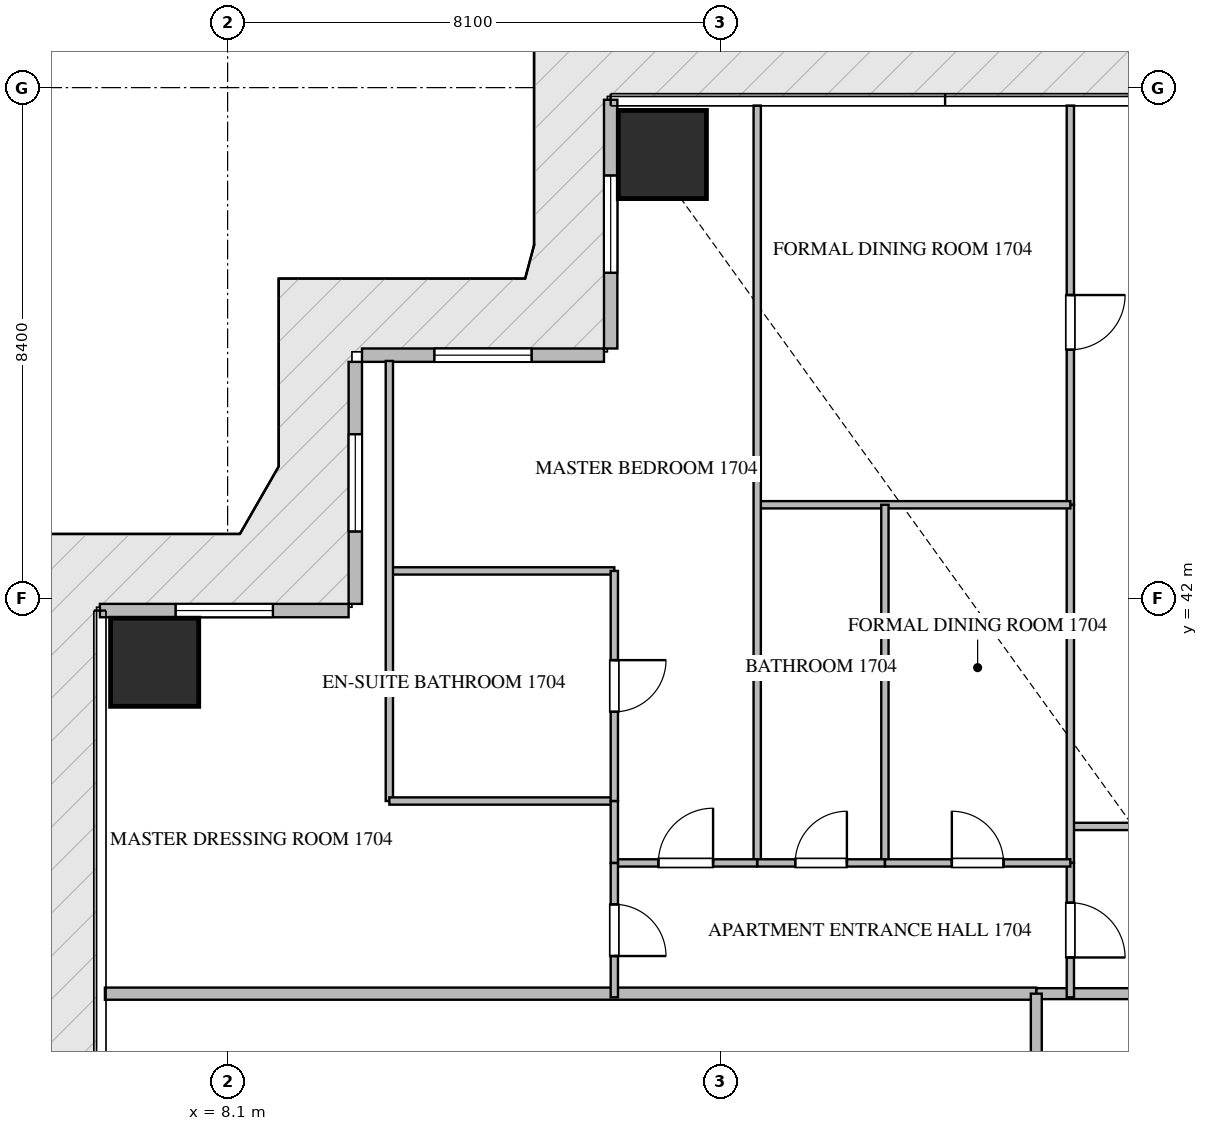
"""IFC4 building model, lengths in metres.
Left out: names, types, materials, properties, quantities, classifications, styles, units other than length and angle.
Written with IfcOpenShell. Run it as: python <this file> out.ifc"""

import sys

from ifc_helpers import new_model, si_unit, direction, frame, frame_2d, origin, origin_2d, place, context, subcontext, project, spatial, rectangle, extrude, source, transform, mapped, element, fill, save


model = new_model("IFC4")
c1 = context("Model", 3, precision=1e-05, world=origin(), true_north=direction((0.0, 1.0)))
c2 = subcontext(c1, "Body", "Model", "MODEL_VIEW")
j1 = project(units=[si_unit("LENGTHUNIT", "METRE"), si_unit("PLANEANGLEUNIT", "RADIAN")], contexts=[c1])
p1 = place(None, origin())
s1 = spatial("IfcSite", under=j1, at=p1, CompositionType="ELEMENT")
p2 = place(p1, origin())
s2 = spatial("IfcBuilding", under=s1, at=p2, CompositionType="ELEMENT")
p3 = place(p2, frame((0.0, 0.0, 71.7)))
s3 = spatial("IfcBuildingStorey", under=s2, at=p3, CompositionType="ELEMENT", Elevation=71.7)
m1 = source(origin(), c2, "Body", "SweptSolid", [
    extrude(rectangle(XDim=1.45, YDim=1.45, at=origin_2d()), origin(), (0.0, 0.0, 1.0), 3.75),
])
for number, where, z_axis, x_axis in (
    (1, (15.25, 49.3, -0.26), (0.0, 0.0, 1.0), (1.0, 0.0, 0.0)),
    (2, (6.9, 40.95, -0.26), (0.0, 0.0, 1.0), (1.0, 0.0, 0.0)),
):
    element("IfcColumn", number, at=place(p3, frame(where, z_axis=z_axis, x_axis=x_axis)), inside=s3, PredefinedType="COLUMN", context=c2, shape_type="MappedRepresentation", body=[
        mapped(m1, transform((0.0, 0.0, 0.0), scale=1.0)),
    ])
p4 = place(p3, frame((14.4, 50.2, 0.0), z_axis=(0.0, 0.0, 1.0), x_axis=(0.0, -1.0, 0.0)))
e3 = element("IfcWall", 3, at=p4, inside=s3, PredefinedType="ELEMENTEDWALL", context=c2, shape_type="SweptSolid", body=[
    extrude(rectangle(XDim=4.09, YDim=0.22, at=frame_2d((2.045, 0.0))), origin(), (0.0, 0.0, 1.0), 3.475),
])
p5 = place(p4, frame((1.245, 0.0, 0.65)))
e4 = element("IfcOpeningElement", 4, at=p5, cuts=e3, PredefinedType="OPENING", context=c2, shape_type="SweptSolid", body=[
    extrude(rectangle(XDim=1.6, YDim=2.1, at=frame_2d((0.8, 1.05))), frame((0.0, 0.12, 0.0), z_axis=(0.0, -1.0, 0.0), x_axis=(1.0, 0.0, 0.0)), (0.0, 0.0, 1.0), 0.24),
])
p6 = place(p3, frame((14.29, 46.0, 0.0), z_axis=(0.0, 0.0, 1.0), x_axis=(-1.0, 0.0, 0.0)))
e5 = element("IfcWall", 5, at=p6, inside=s3, PredefinedType="ELEMENTEDWALL", context=c2, shape_type="SweptSolid", body=[
    extrude(rectangle(XDim=3.98, YDim=0.22, at=frame_2d((1.99, 0.0))), origin(), (0.0, 0.0, 1.0), 3.475),
])
p7 = place(p6, frame((1.19, 0.0, 0.65)))
e6 = element("IfcOpeningElement", 6, at=p7, cuts=e5, PredefinedType="OPENING", context=c2, shape_type="SweptSolid", body=[
    extrude(rectangle(XDim=1.6, YDim=2.1, at=frame_2d((0.8, 1.05))), frame((0.0, 0.12, 0.0), z_axis=(0.0, -1.0, 0.0), x_axis=(1.0, 0.0, 0.0)), (0.0, 0.0, 1.0), 0.24),
])
p8 = place(p3, frame((10.2, 45.89, 0.0), z_axis=(0.0, 0.0, 1.0), x_axis=(0.0, -1.0, 0.0)))
e7 = element("IfcWall", 7, at=p8, inside=s3, PredefinedType="ELEMENTEDWALL", context=c2, shape_type="SweptSolid", body=[
    extrude(rectangle(XDim=3.98, YDim=0.22, at=frame_2d((1.99, 0.0))), origin(), (0.0, 0.0, 1.0), 3.475),
])
p9 = place(p8, frame((1.19, 0.0, 0.65)))
e8 = element("IfcOpeningElement", 8, at=p9, cuts=e7, PredefinedType="OPENING", context=c2, shape_type="SweptSolid", body=[
    extrude(rectangle(XDim=1.6, YDim=2.1, at=frame_2d((0.8, 1.05))), frame((0.0, 0.12, 0.0), z_axis=(0.0, -1.0, 0.0), x_axis=(1.0, 0.0, 0.0)), (0.0, 0.0, 1.0), 0.24),
])
p10 = place(p3, frame((10.09, 41.8, 0.0), z_axis=(0.0, 0.0, 1.0), x_axis=(-1.0, 0.0, 0.0)))
e9 = element("IfcWall", 9, at=p10, inside=s3, PredefinedType="ELEMENTEDWALL", context=c2, shape_type="SweptSolid", body=[
    extrude(rectangle(XDim=4.09, YDim=0.22, at=frame_2d((2.045, 0.0))), origin(), (0.0, 0.0, 1.0), 3.475),
])
p11 = place(p10, frame((1.245, 0.0, 0.65)))
e10 = element("IfcOpeningElement", 10, at=p11, cuts=e9, PredefinedType="OPENING", context=c2, shape_type="SweptSolid", body=[
    extrude(rectangle(XDim=1.6, YDim=2.1, at=frame_2d((0.8, 1.05))), frame((0.0, 0.12, 0.0), z_axis=(0.0, -1.0, 0.0), x_axis=(1.0, 0.0, 0.0)), (0.0, 0.0, 1.0), 0.24),
])
p12 = place(p3, frame((6.082, 35.5, 0.0), z_axis=(0.0, 0.0, 1.0), x_axis=(1.0, 0.0, 0.0)))
e11 = element("IfcWall", 11, at=p12, inside=s3, PredefinedType="PARTITIONING", context=c2, shape_type="SweptSolid", body=[
    extrude(rectangle(XDim=15.318, YDim=0.2, at=frame_2d((7.659, 0.0))), origin(), (0.0, 0.0, 1.0), 3.49),
])
p13 = place(p3, frame((21.402, 35.5, 0.0), z_axis=(0.0, 0.0, 1.0), x_axis=(1.0, 0.0, 0.0)))
e12 = element("IfcWall", 12, at=p13, inside=s3, PredefinedType="PARTITIONING", context=c2, shape_type="SweptSolid", body=[
    extrude(rectangle(XDim=21.996, YDim=0.18, at=frame_2d((10.998, 0.0))), origin(), (0.0, 0.0, 1.0), 3.49),
])
p14 = place(p13, frame((5.774, 0.0, 0.0)))
e13 = element("IfcOpeningElement", 13, at=p14, cuts=e12, PredefinedType="OPENING", context=c2, shape_type="SweptSolid", body=[
    extrude(rectangle(XDim=1.0, YDim=2.15, at=frame_2d((0.5, 1.075))), frame((0.0, 0.1, 0.0), z_axis=(0.0, -1.0, 0.0), x_axis=(1.0, 0.0, 0.0)), (0.0, 0.0, 1.0), 0.2),
])
p15 = place(p13, frame((16.272, 0.0, 0.0)))
e14 = element("IfcOpeningElement", 14, at=p15, cuts=e12, PredefinedType="OPENING", context=c2, shape_type="SweptSolid", body=[
    extrude(rectangle(XDim=1.0, YDim=2.15, at=frame_2d((0.5, 1.075))), frame((0.0, 0.1, 0.0), z_axis=(0.0, -1.0, 0.0), x_axis=(1.0, 0.0, 0.0)), (0.0, 0.0, 1.0), 0.2),
])
p16 = place(p3, frame((21.4, 14.9, 0.0), z_axis=(0.0, 0.0, 1.0), x_axis=(0.0, 1.0, 0.0)))
e15 = element("IfcWall", 15, at=p16, inside=s3, PredefinedType="PARTITIONING", context=c2, shape_type="SweptSolid", body=[
    extrude(rectangle(XDim=20.6, YDim=0.18, at=frame_2d((10.3, 0.0))), origin(), (0.0, 0.0, 1.0), 3.49),
])
p17 = place(p16, frame((1.96, 0.0, 0.0)))
e16 = element("IfcOpeningElement", 16, at=p17, cuts=e15, PredefinedType="OPENING", context=c2, shape_type="SweptSolid", body=[
    extrude(rectangle(XDim=1.0, YDim=2.15, at=frame_2d((0.5, 1.075))), frame((0.0, 0.1, 0.0), z_axis=(0.0, -1.0, 0.0), x_axis=(1.0, 0.0, 0.0)), (0.0, 0.0, 1.0), 0.2),
])
p18 = place(p16, frame((15.778, 0.0, 0.0)))
e17 = element("IfcOpeningElement", 17, at=p18, cuts=e15, PredefinedType="OPENING", context=c2, shape_type="SweptSolid", body=[
    extrude(rectangle(XDim=1.0, YDim=2.15, at=frame_2d((0.5, 1.075))), frame((0.0, 0.1, 0.0), z_axis=(0.0, -1.0, 0.0), x_axis=(1.0, 0.0, 0.0)), (0.0, 0.0, 1.0), 0.2),
])
p19 = place(p3, frame((21.96, 38.25, 0.0), z_axis=(0.0, 0.0, 1.0), x_axis=(1.0, 0.0, 0.0)))
e18 = element("IfcWall", 18, at=p19, inside=s3, PredefinedType="PARTITIONING", context=c2, shape_type="SweptSolid", body=[
    extrude(rectangle(XDim=2.85, YDim=0.12, at=frame_2d((1.425, 0.0))), origin(), (0.0, 0.0, 1.0), 3.49),
])
p20 = place(p19, frame((1.0, 0.0, 0.0)))
e19 = element("IfcOpeningElement", 19, at=p20, cuts=e18, PredefinedType="OPENING", context=c2, shape_type="SweptSolid", body=[
    extrude(rectangle(XDim=0.85, YDim=2.1, at=frame_2d((0.425, 1.05))), frame((0.0, 0.07, 0.0), z_axis=(0.0, -1.0, 0.0), x_axis=(1.0, 0.0, 0.0)), (0.0, 0.0, 1.0), 0.14),
])
p21 = place(p3, frame((21.96, 37.65, 0.0), z_axis=(0.0, 0.0, 1.0), x_axis=(0.0, -1.0, 0.0)))
e20 = element("IfcWall", 20, at=p21, inside=s3, PredefinedType="PARTITIONING", context=c2, shape_type="SweptSolid", body=[
    extrude(rectangle(XDim=2.21, YDim=0.12, at=frame_2d((1.105, 0.0))), origin(), (0.0, 0.0, 1.0), 3.49),
])
p22 = place(p21, frame((0.655, 0.0, 0.0)))
e21 = element("IfcOpeningElement", 21, at=p22, cuts=e20, PredefinedType="OPENING", context=c2, shape_type="SweptSolid", body=[
    extrude(rectangle(XDim=0.9, YDim=2.1, at=frame_2d((0.45, 1.05))), frame((0.0, 0.07, 0.0), z_axis=(0.0, -1.0, 0.0), x_axis=(1.0, 0.0, 0.0)), (0.0, 0.0, 1.0), 0.14),
])
p23 = place(p3, frame((21.96, 50.105, 0.0), z_axis=(0.0, 0.0, 1.0), x_axis=(0.0, -1.0, 0.0)))
e22 = element("IfcWall", 22, at=p23, inside=s3, PredefinedType="PARTITIONING", context=c2, shape_type="SweptSolid", body=[
    extrude(rectangle(XDim=6.565, YDim=0.12, at=frame_2d((3.282, 0.0))), origin(), (0.0, 0.0, 1.0), 3.49),
])
p24 = place(p23, frame((3.116, 0.0, 0.0)))
e23 = element("IfcOpeningElement", 23, at=p24, cuts=e22, PredefinedType="OPENING", context=c2, shape_type="SweptSolid", body=[
    extrude(rectangle(XDim=0.9, YDim=2.1, at=frame_2d((0.45, 1.05))), frame((0.0, 0.07, 0.0), z_axis=(0.0, -1.0, 0.0), x_axis=(1.0, 0.0, 0.0)), (0.0, 0.0, 1.0), 0.14),
])
p25 = place(p3, frame((21.96, 43.538, 0.0), z_axis=(0.0, 0.0, 1.0), x_axis=(0.0, -1.0, 0.0)))
e24 = element("IfcWall", 24, at=p25, inside=s3, PredefinedType="PARTITIONING", context=c2, shape_type="SweptSolid", body=[
    extrude(rectangle(XDim=5.886, YDim=0.12, at=frame_2d((2.943, 0.0))), origin(), (0.0, 0.0, 1.0), 3.49),
])
p26 = place(p3, frame((16.81, 43.54, 0.0), z_axis=(0.0, 0.0, 1.0), x_axis=(1.0, 0.0, 0.0)))
e25 = element("IfcWall", 25, at=p26, inside=s3, PredefinedType="PARTITIONING", context=c2, shape_type="SweptSolid", body=[
    extrude(rectangle(XDim=5.15, YDim=0.12, at=frame_2d((2.575, 0.0))), origin(), (0.0, 0.0, 1.0), 3.49),
])
p27 = place(p3, frame((16.81, 50.105, 0.0), z_axis=(0.0, 0.0, 1.0), x_axis=(0.0, -1.0, 0.0)))
e26 = element("IfcWall", 26, at=p27, inside=s3, PredefinedType="PARTITIONING", context=c2, shape_type="SweptSolid", body=[
    extrude(rectangle(XDim=12.455, YDim=0.12, at=frame_2d((6.228, 0.0))), origin(), (0.0, 0.0, 1.0), 3.49),
])
p28 = place(p3, frame((18.91, 43.54, 0.0), z_axis=(0.0, 0.0, 1.0), x_axis=(0.0, -1.0, 0.0)))
e27 = element("IfcWall", 27, at=p28, inside=s3, PredefinedType="PARTITIONING", context=c2, shape_type="SweptSolid", body=[
    extrude(rectangle(XDim=5.89, YDim=0.12, at=frame_2d((2.945, 0.0))), origin(), (0.0, 0.0, 1.0), 3.49),
])
p29 = place(p3, frame((16.81, 37.65, 0.0), z_axis=(0.0, 0.0, 1.0), x_axis=(1.0, 0.0, 0.0)))
e28 = element("IfcWall", 28, at=p29, inside=s3, PredefinedType="PARTITIONING", context=c2, shape_type="SweptSolid", body=[
    extrude(rectangle(XDim=2.1, YDim=0.12, at=frame_2d((1.05, 0.0))), origin(), (0.0, 0.0, 1.0), 3.49),
])
p30 = place(p29, frame((0.625, 0.0, 0.0)))
e29 = element("IfcOpeningElement", 29, at=p30, cuts=e28, PredefinedType="OPENING", context=c2, shape_type="SweptSolid", body=[
    extrude(rectangle(XDim=0.85, YDim=2.1, at=frame_2d((0.425, 1.05))), frame((0.0, 0.07, 0.0), z_axis=(0.0, -1.0, 0.0), x_axis=(1.0, 0.0, 0.0)), (0.0, 0.0, 1.0), 0.14),
])
p31 = place(p3, frame((18.912, 37.65, 0.0), z_axis=(0.0, 0.0, 1.0), x_axis=(1.0, 0.0, 0.0)))
e30 = element("IfcWall", 30, at=p31, inside=s3, PredefinedType="PARTITIONING", context=c2, shape_type="SweptSolid", body=[
    extrude(rectangle(XDim=3.048, YDim=0.12, at=frame_2d((1.524, 0.0))), origin(), (0.0, 0.0, 1.0), 3.49),
])
p32 = place(p31, frame((1.099, 0.0, 0.0)))
e31 = element("IfcOpeningElement", 31, at=p32, cuts=e30, PredefinedType="OPENING", context=c2, shape_type="SweptSolid", body=[
    extrude(rectangle(XDim=0.85, YDim=2.1, at=frame_2d((0.425, 1.05))), frame((0.0, 0.07, 0.0), z_axis=(0.0, -1.0, 0.0), x_axis=(1.0, 0.0, 0.0)), (0.0, 0.0, 1.0), 0.14),
])
p33 = place(p3, frame((14.46, 37.65, 0.0), z_axis=(0.0, 0.0, 1.0), x_axis=(1.0, 0.0, 0.0)))
e32 = element("IfcWall", 32, at=p33, inside=s3, PredefinedType="PARTITIONING", context=c2, shape_type="SweptSolid", body=[
    extrude(rectangle(XDim=2.348, YDim=0.12, at=frame_2d((1.174, 0.0))), origin(), (0.0, 0.0, 1.0), 3.49),
])
p34 = place(p33, frame((0.724, 0.0, 0.0)))
e33 = element("IfcOpeningElement", 33, at=p34, cuts=e32, PredefinedType="OPENING", context=c2, shape_type="SweptSolid", body=[
    extrude(rectangle(XDim=0.9, YDim=2.1, at=frame_2d((0.45, 1.05))), frame((0.0, 0.07, 0.0), z_axis=(0.0, -1.0, 0.0), x_axis=(1.0, 0.0, 0.0)), (0.0, 0.0, 1.0), 0.14),
])
p35 = place(p3, frame((10.76, 42.452, 0.0), z_axis=(0.0, 0.0, 1.0), x_axis=(1.0, 0.0, 0.0)))
e34 = element("IfcWall", 34, at=p35, inside=s3, PredefinedType="PARTITIONING", context=c2, shape_type="SweptSolid", body=[
    extrude(rectangle(XDim=3.7, YDim=0.12, at=frame_2d((1.85, 0.0))), origin(), (0.0, 0.0, 1.0), 3.49),
])
p36 = place(p3, frame((10.76, 45.905, 0.0), z_axis=(0.0, 0.0, 1.0), x_axis=(0.0, -1.0, 0.0)))
e35 = element("IfcWall", 35, at=p36, inside=s3, PredefinedType="PARTITIONING", context=c2, shape_type="SweptSolid", body=[
    extrude(rectangle(XDim=7.237, YDim=0.12, at=frame_2d((3.619, 0.0))), origin(), (0.0, 0.0, 1.0), 3.49),
])
p37 = place(p3, frame((10.76, 38.668, 0.0), z_axis=(0.0, 0.0, 1.0), x_axis=(1.0, 0.0, 0.0)))
e36 = element("IfcWall", 36, at=p37, inside=s3, PredefinedType="PARTITIONING", context=c2, shape_type="SweptSolid", body=[
    extrude(rectangle(XDim=3.7, YDim=0.12, at=frame_2d((1.85, 0.0))), origin(), (0.0, 0.0, 1.0), 3.49),
])
p38 = place(p3, frame((14.46, 42.452, 0.0), z_axis=(0.0, 0.0, 1.0), x_axis=(0.0, -1.0, 0.0)))
e37 = element("IfcWall", 37, at=p38, inside=s3, PredefinedType="PARTITIONING", context=c2, shape_type="SweptSolid", body=[
    extrude(rectangle(XDim=3.784, YDim=0.12, at=frame_2d((1.892, 0.0))), origin(), (0.0, 0.0, 1.0), 3.49),
])
p39 = place(p38, frame((1.467, 0.0, 0.0)))
e38 = element("IfcOpeningElement", 38, at=p39, cuts=e37, PredefinedType="OPENING", context=c2, shape_type="SweptSolid", body=[
    extrude(rectangle(XDim=0.85, YDim=2.1, at=frame_2d((0.425, 1.05))), frame((0.0, 0.07, 0.0), z_axis=(0.0, -1.0, 0.0), x_axis=(1.0, 0.0, 0.0)), (0.0, 0.0, 1.0), 0.14),
])
p40 = place(p3, frame((14.46, 38.666, 0.0), z_axis=(0.0, 0.0, 1.0), x_axis=(0.0, -1.0, 0.0)))
e39 = element("IfcWall", 39, at=p40, inside=s3, PredefinedType="PARTITIONING", context=c2, shape_type="SweptSolid", body=[
    extrude(rectangle(XDim=1.016, YDim=0.12, at=frame_2d((0.508, 0.0))), origin(), (0.0, 0.0, 1.0), 3.49),
])
p41 = place(p3, frame((14.46, 37.648, 0.0), z_axis=(0.0, 0.0, 1.0), x_axis=(0.0, -1.0, 0.0)))
e40 = element("IfcWall", 40, at=p41, inside=s3, PredefinedType="PARTITIONING", context=c2, shape_type="SweptSolid", body=[
    extrude(rectangle(XDim=2.208, YDim=0.12, at=frame_2d((1.104, 0.0))), origin(), (0.0, 0.0, 1.0), 3.49),
])
p42 = place(p41, frame((0.679, 0.0, 0.0)))
e41 = element("IfcOpeningElement", 41, at=p42, cuts=e40, PredefinedType="OPENING", context=c2, shape_type="SweptSolid", body=[
    extrude(rectangle(XDim=0.85, YDim=2.1, at=frame_2d((0.425, 1.05))), frame((0.0, 0.07, 0.0), z_axis=(0.0, -1.0, 0.0), x_axis=(1.0, 0.0, 0.0)), (0.0, 0.0, 1.0), 0.14),
])
m2 = source(origin(), c2, "Body", "SweptSolid", [
    extrude(rectangle(XDim=1.6, YDim=2.1, at=frame_2d((0.8, 1.05))), frame((0.0, 0.03, 0.0), z_axis=(0.0, -1.0, 0.0), x_axis=(1.0, 0.0, 0.0)), (0.0, 0.0, 1.0), 0.06),
])
p43 = place(p5, origin())
e42 = element("IfcWindow", 42, at=p43, inside=s3, PartitioningType="SINGLE_PANEL", PredefinedType="WINDOW", context=c2, shape_type="MappedRepresentation", body=[
    mapped(m2, transform((0.0, 0.0, 0.0), scale=1.0)),
])
fill(e4, e42)
p44 = place(p7, origin())
e43 = element("IfcWindow", 43, at=p44, inside=s3, PartitioningType="SINGLE_PANEL", PredefinedType="WINDOW", context=c2, shape_type="MappedRepresentation", body=[
    mapped(m2, transform((0.0, 0.0, 0.0), scale=1.0)),
])
fill(e6, e43)
p45 = place(p9, origin())
e44 = element("IfcWindow", 44, at=p45, inside=s3, PartitioningType="SINGLE_PANEL", PredefinedType="WINDOW", context=c2, shape_type="MappedRepresentation", body=[
    mapped(m2, transform((0.0, 0.0, 0.0), scale=1.0)),
])
fill(e8, e44)
p46 = place(p11, origin())
e45 = element("IfcWindow", 45, at=p46, inside=s3, PartitioningType="SINGLE_PANEL", PredefinedType="WINDOW", context=c2, shape_type="MappedRepresentation", body=[
    mapped(m2, transform((0.0, 0.0, 0.0), scale=1.0)),
])
fill(e10, e45)
m3 = source(origin(), c2, "Body", "SweptSolid", [
    extrude(rectangle(XDim=0.9, YDim=2.1, at=frame_2d((0.45, 1.05))), frame((0.0, 0.025, 0.0), z_axis=(0.0, -1.0, 0.0), x_axis=(1.0, 0.0, 0.0)), (0.0, 0.0, 1.0), 0.05),
])
p47 = place(p22, origin())
e46 = element("IfcDoor", 46, at=p47, inside=s3, OperationType="SINGLE_SWING_RIGHT", PredefinedType="DOOR", context=c2, shape_type="MappedRepresentation", body=[
    mapped(m3, transform((0.0, 0.0, 0.0), scale=1.0)),
])
fill(e21, e46)
p48 = place(p24, origin())
e47 = element("IfcDoor", 47, at=p48, inside=s3, OperationType="SINGLE_SWING_LEFT", PredefinedType="DOOR", context=c2, shape_type="MappedRepresentation", body=[
    mapped(m3, transform((0.0, 0.0, 0.0), scale=1.0)),
])
fill(e23, e47)
m4 = source(origin(), c2, "Body", "SweptSolid", [
    extrude(rectangle(XDim=0.85, YDim=2.1, at=frame_2d((0.425, 1.05))), frame((0.0, 0.025, 0.0), z_axis=(0.0, -1.0, 0.0), x_axis=(1.0, 0.0, 0.0)), (0.0, 0.0, 1.0), 0.05),
])
p49 = place(p30, origin())
e48 = element("IfcDoor", 48, at=p49, inside=s3, OperationType="SINGLE_SWING_RIGHT", PredefinedType="DOOR", context=c2, shape_type="MappedRepresentation", body=[
    mapped(m4, transform((0.0, 0.0, 0.0), scale=1.0)),
])
fill(e29, e48)
p50 = place(p32, origin())
e49 = element("IfcDoor", 49, at=p50, inside=s3, OperationType="SINGLE_SWING_LEFT", PredefinedType="DOOR", context=c2, shape_type="MappedRepresentation", body=[
    mapped(m4, transform((0.0, 0.0, 0.0), scale=1.0)),
])
fill(e31, e49)
p51 = place(p34, origin())
e50 = element("IfcDoor", 50, at=p51, inside=s3, OperationType="SINGLE_SWING_RIGHT", PredefinedType="DOOR", context=c2, shape_type="MappedRepresentation", body=[
    mapped(m3, transform((0.0, 0.0, 0.0), scale=1.0)),
])
fill(e33, e50)
p52 = place(p39, origin())
e51 = element("IfcDoor", 51, at=p52, inside=s3, OperationType="SINGLE_SWING_LEFT", PredefinedType="DOOR", context=c2, shape_type="MappedRepresentation", body=[
    mapped(m4, transform((0.0, 0.0, 0.0), scale=1.0)),
])
fill(e38, e51)
p53 = place(p42, origin())
e52 = element("IfcDoor", 52, at=p53, inside=s3, OperationType="SINGLE_SWING_RIGHT", PredefinedType="DOOR", context=c2, shape_type="MappedRepresentation", body=[
    mapped(m4, transform((0.0, 0.0, 0.0), scale=1.0)),
])
fill(e41, e52)
save(model, sys.argv[1])
